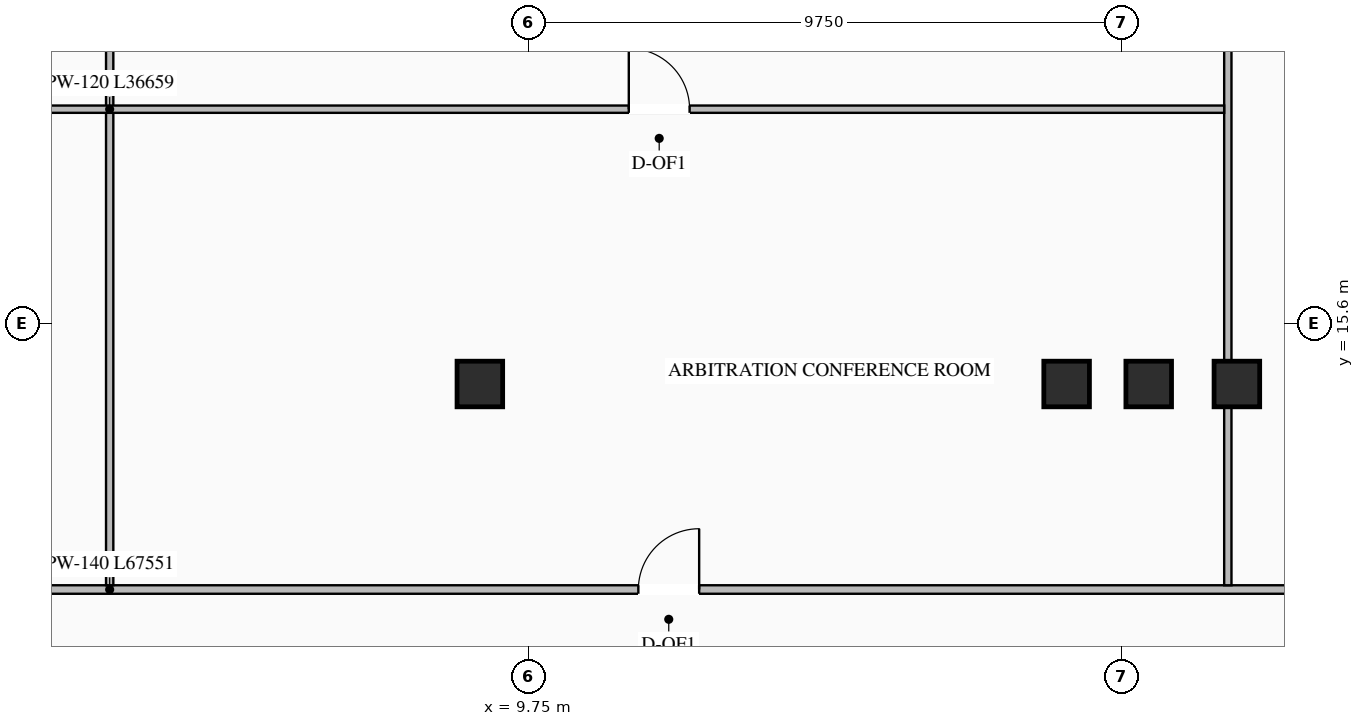
"""IFC4 building model, lengths in metres.
Left out: names, types, materials, properties, quantities, classifications, styles, units other than length and angle.
Written with IfcOpenShell. Run it as: python <this file> out.ifc"""

import sys

from ifc_helpers import new_model, si_unit, direction, frame, frame_2d, origin, origin_2d, place, context, subcontext, project, spatial, rectangle, i_section, extrude, element, fill, save


model = new_model("IFC4")
c1 = context("Model", 3, precision=1e-05, world=origin(), true_north=direction((0.0, 1.0)))
c2 = subcontext(c1, "Body", "Model", "MODEL_VIEW")
j1 = project(units=[si_unit("LENGTHUNIT", "METRE"), si_unit("PLANEANGLEUNIT", "RADIAN")], contexts=[c1])
p1 = place(None, origin())
s1 = spatial("IfcSite", under=j1, at=p1, CompositionType="ELEMENT")
p2 = place(p1, origin())
s2 = spatial("IfcBuilding", under=s1, at=p2, CompositionType="ELEMENT")
p3 = place(p2, frame((0.0, 0.0, 94.9)))
s3 = spatial("IfcBuildingStorey", under=s2, at=p3, CompositionType="ELEMENT", Elevation=94.9)
for number, where, z_axis, x_axis in (
    (1, (8.95, 14.6, 0.0), (0.0, 0.0, 1.0), (1.0, 0.0, 0.0)),
    (2, (18.6, 14.6, 0.0), (0.0, 0.0, 1.0), (1.0, 0.0, 0.0)),
    (3, (19.95, 14.6, 0.0), (0.0, 0.0, 1.0), (1.0, 0.0, 0.0)),
    (4, (21.4, 14.6, 0.0), (0.0, 0.0, 1.0), (1.0, 0.0, 0.0)),
):
    element("IfcColumn", number, at=place(p3, frame(where, z_axis=z_axis, x_axis=x_axis)), inside=s3, PredefinedType="COLUMN", context=c2, shape_type="SweptSolid", body=[
        extrude(i_section(OverallWidth=0.75, OverallDepth=0.75, WebThickness=0.03, FlangeThickness=0.044, at=origin_2d()), origin(), (0.0, 0.0, 1.0), 3.45),
    ])
p4 = place(p3, frame((-30.567, 11.22, 0.0), z_axis=(0.0, 0.0, 1.0), x_axis=(1.0, 0.0, 0.0)))
e5 = element("IfcWall", 5, at=p4, inside=s3, PredefinedType="STANDARD", context=c2, shape_type="SweptSolid", body=[
    extrude(rectangle(XDim=67.551, YDim=0.14, at=frame_2d((33.775, 0.0))), origin(), (0.0, 0.0, 1.0), 3.25),
])
p5 = place(p4, frame((7.146, 0.0, 0.0)))
e6 = element("IfcOpeningElement", 6, at=p5, cuts=e5, PredefinedType="OPENING", context=c2, shape_type="SweptSolid", body=[
    extrude(rectangle(XDim=1.0, YDim=2.08, at=frame_2d((0.5, 1.04))), frame((0.0, 0.08, 0.0), z_axis=(0.0, -1.0, 0.0), x_axis=(1.0, 0.0, 0.0)), (0.0, 0.0, 1.0), 0.16),
])
p6 = place(p4, frame((23.734, 0.0, 0.0)))
e7 = element("IfcOpeningElement", 7, at=p6, cuts=e5, PredefinedType="OPENING", context=c2, shape_type="SweptSolid", body=[
    extrude(rectangle(XDim=1.0, YDim=2.08, at=frame_2d((0.5, 1.04))), frame((0.0, 0.08, 0.0), z_axis=(0.0, -1.0, 0.0), x_axis=(1.0, 0.0, 0.0)), (0.0, 0.0, 1.0), 0.16),
])
p7 = place(p4, frame((42.124, 0.0, 0.0)))
e8 = element("IfcOpeningElement", 8, at=p7, cuts=e5, PredefinedType="OPENING", context=c2, shape_type="SweptSolid", body=[
    extrude(rectangle(XDim=1.0, YDim=2.08, at=frame_2d((0.5, 1.04))), frame((0.0, 0.08, 0.0), z_axis=(0.0, -1.0, 0.0), x_axis=(1.0, 0.0, 0.0)), (0.0, 0.0, 1.0), 0.16),
])
p8 = place(p4, frame((59.059, 0.0, 0.0)))
e9 = element("IfcOpeningElement", 9, at=p8, cuts=e5, PredefinedType="OPENING", context=c2, shape_type="SweptSolid", body=[
    extrude(rectangle(XDim=1.0, YDim=2.08, at=frame_2d((0.5, 1.04))), frame((0.0, 0.08, 0.0), z_axis=(0.0, -1.0, 0.0), x_axis=(1.0, 0.0, 0.0)), (0.0, 0.0, 1.0), 0.16),
])
p9 = place(p3, frame((2.862, 11.29, 0.0), z_axis=(0.0, 0.0, 1.0), x_axis=(0.0, 1.0, 0.0)))
e10 = element("IfcWall", 10, at=p9, inside=s3, PredefinedType="STANDARD", context=c2, shape_type="SweptSolid", body=[
    extrude(rectangle(XDim=12.818, YDim=0.12, at=frame_2d((6.409, 0.0))), origin(), (0.0, 0.0, 1.0), 3.25),
])
p10 = place(p3, frame((21.251, 11.29, 0.0), z_axis=(0.0, 0.0, 1.0), x_axis=(0.0, 1.0, 0.0)))
e11 = element("IfcWall", 11, at=p10, inside=s3, PredefinedType="STANDARD", context=c2, shape_type="SweptSolid", body=[
    extrude(rectangle(XDim=14.589, YDim=0.12, at=frame_2d((7.294, 0.0))), origin(), (0.0, 0.0, 1.0), 2.645),
])
p11 = place(p3, frame((-15.468, 19.12, 0.0), z_axis=(0.0, 0.0, 1.0), x_axis=(1.0, 0.0, 0.0)))
e12 = element("IfcWall", 12, at=p11, inside=s3, PredefinedType="STANDARD", context=c2, shape_type="SweptSolid", body=[
    extrude(rectangle(XDim=36.659, YDim=0.12, at=frame_2d((18.33, 0.0))), origin(), (0.0, 0.0, 1.0), 3.25),
])
p12 = place(p11, frame((8.792, 0.0, 0.0)))
e13 = element("IfcOpeningElement", 13, at=p12, cuts=e12, PredefinedType="OPENING", context=c2, shape_type="SweptSolid", body=[
    extrude(rectangle(XDim=1.0, YDim=2.08, at=frame_2d((0.5, 1.04))), frame((0.0, 0.07, 0.0), z_axis=(0.0, -1.0, 0.0), x_axis=(1.0, 0.0, 0.0)), (0.0, 0.0, 1.0), 0.14),
])
p13 = place(p11, frame((26.867, 0.0, 0.0)))
e14 = element("IfcOpeningElement", 14, at=p13, cuts=e12, PredefinedType="OPENING", context=c2, shape_type="SweptSolid", body=[
    extrude(rectangle(XDim=1.0, YDim=2.08, at=frame_2d((0.5, 1.04))), frame((0.0, 0.07, 0.0), z_axis=(0.0, -1.0, 0.0), x_axis=(1.0, 0.0, 0.0)), (0.0, 0.0, 1.0), 0.14),
])
p14 = place(p7, origin())
e15 = element("IfcDoor", 15, at=p14, inside=s3, OperationType="SINGLE_SWING_RIGHT", PredefinedType="DOOR", context=c2, shape_type="SweptSolid", body=[
    extrude(rectangle(XDim=1.0, YDim=2.08, at=frame_2d((0.5, 1.04))), frame((0.0, 0.025, 0.0), z_axis=(0.0, -1.0, 0.0), x_axis=(1.0, 0.0, 0.0)), (0.0, 0.0, 1.0), 0.05),
])
fill(e8, e15)
p15 = place(p13, origin())
e16 = element("IfcDoor", 16, at=p15, inside=s3, OperationType="SINGLE_SWING_LEFT", PredefinedType="DOOR", context=c2, shape_type="SweptSolid", body=[
    extrude(rectangle(XDim=1.0, YDim=2.08, at=frame_2d((0.5, 1.04))), frame((0.0, 0.025, 0.0), z_axis=(0.0, -1.0, 0.0), x_axis=(1.0, 0.0, 0.0)), (0.0, 0.0, 1.0), 0.05),
])
fill(e14, e16)
save(model, sys.argv[1])
